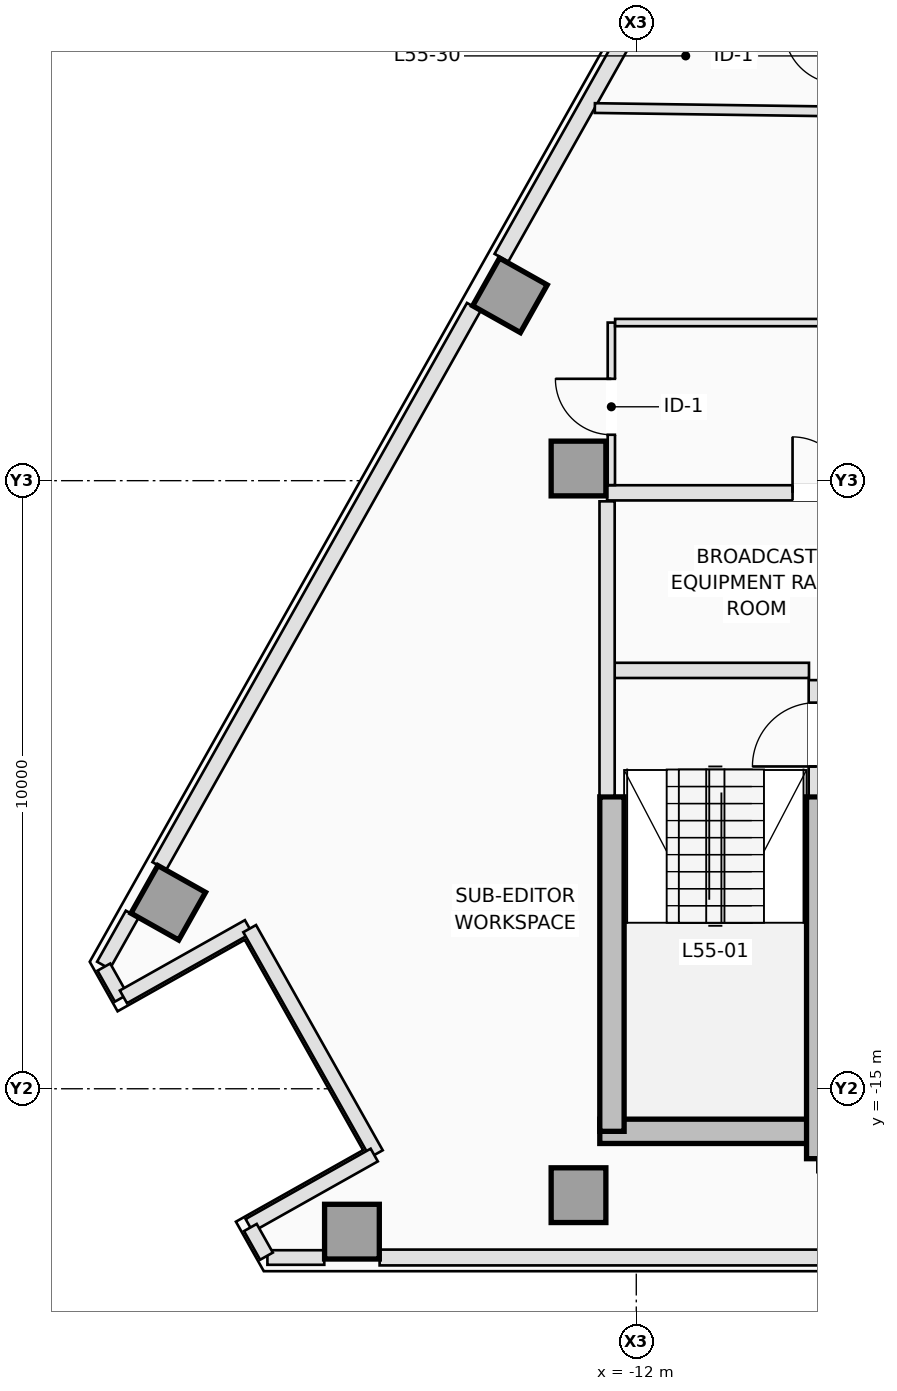
"""IFC4 building model, lengths in metres.
Left out: names, types, materials, properties, quantities, classifications, styles, units other than length and angle.
Written with IfcOpenShell. Run it as: python <this file> out.ifc"""

import sys

from ifc_helpers import new_model, si_unit, direction, frame, frame_2d, origin, origin_2d, place, context, subcontext, project, spatial, rectangle, extrude, element, fill, save


model = new_model("IFC4")
c1 = context("Model", 3, precision=1e-05, world=origin(), true_north=direction((0.0, 1.0)))
c2 = subcontext(c1, "Body", "Model", "MODEL_VIEW")
j1 = project(units=[si_unit("LENGTHUNIT", "METRE"), si_unit("PLANEANGLEUNIT", "RADIAN")], contexts=[c1])
p1 = place(None, origin())
s1 = spatial("IfcSite", under=j1, at=p1, CompositionType="ELEMENT")
p2 = place(p1, origin())
s2 = spatial("IfcBuilding", under=s1, at=p2, CompositionType="ELEMENT")
p3 = place(p2, frame((0.0, 0.0, 200.9)))
s3 = spatial("IfcBuildingStorey", under=s2, at=p3, CompositionType="ELEMENT", Elevation=200.9)
p4 = place(p3, frame((-12.6, -15.7, 0.0), z_axis=(0.0, 0.0, 1.0), x_axis=(1.0, 0.0, 0.0)))
e1 = element("IfcWall", 1, at=p4, inside=s3, PredefinedType="SHEAR", context=c2, shape_type="SweptSolid", body=[
    extrude(rectangle(XDim=3.8, YDim=0.4, at=frame_2d((1.9, 0.0))), origin(), (0.0, 0.0, 1.0), 3.5),
])
p5 = place(p3, frame((-12.4, -15.7, 0.0), z_axis=(0.0, 0.0, 1.0), x_axis=(0.0, 1.0, 0.0)))
e2 = element("IfcWall", 2, at=p5, inside=s3, PredefinedType="SHEAR", context=c2, shape_type="SweptSolid", body=[
    extrude(rectangle(XDim=5.5, YDim=0.4, at=frame_2d((2.75, 0.0))), origin(), (0.0, 0.0, 1.0), 3.5),
])
p6 = place(p3, frame((-9.0, -16.15, 0.0), z_axis=(0.0, 0.0, 1.0), x_axis=(0.0, 1.0, 0.0)))
e3 = element("IfcWall", 3, at=p6, inside=s3, PredefinedType="SHEAR", context=c2, shape_type="SweptSolid", body=[
    extrude(rectangle(XDim=5.95, YDim=0.4, at=frame_2d((2.975, 0.0))), origin(), (0.0, 0.0, 1.0), 3.5),
])
for number, where, z_axis, x_axis in (
    (4, (-12.95, -16.75, 0.0), (0.0, 0.0, 1.0), (1.0, 0.0, 0.0)),
    (5, (-12.95, -4.8, 0.0), (0.0, 0.0, 1.0), (1.0, 0.0, 0.0)),
    (6, (-16.676, -17.35, 0.0), (0.0, 0.0, 1.0), (0.0, 1.0, 0.0)),
    (7, (-14.077, -1.952, 0.0), (0.0, 0.0, 1.0), (-0.872, 0.49, 0.0)),
    (8, (-19.697, -11.942, 0.0), (0.0, 0.0, 1.0), (-0.872, 0.49, 0.0)),
):
    element("IfcColumn", number, at=place(p3, frame(where, z_axis=z_axis, x_axis=x_axis)), inside=s3, PredefinedType="COLUMN", context=c2, shape_type="SweptSolid", body=[
        extrude(rectangle(XDim=0.9, YDim=0.9, at=origin_2d()), origin(), (0.0, 0.0, 1.0), 3.5),
    ])
p7 = place(p3, frame((-17.131, -17.775, 0.0), z_axis=(0.0, 0.0, 1.0), x_axis=(-1.0, 0.0, 0.0)))
e9 = element("IfcWall", 9, at=p7, inside=s3, PredefinedType="STANDARD", context=c2, shape_type="SweptSolid", body=[
    extrude(rectangle(XDim=0.935, YDim=0.24, at=frame_2d((0.468, 0.0))), origin(), (0.0, 0.0, 1.0), 3.25),
])
p8 = place(p3, frame((-5.893, -17.775, 0.0), z_axis=(0.0, 0.0, 1.0), x_axis=(-1.0, 0.0, 0.0)))
e10 = element("IfcWall", 10, at=p8, inside=s3, PredefinedType="STANDARD", context=c2, shape_type="SweptSolid", body=[
    extrude(rectangle(XDim=10.328, YDim=0.26, at=frame_2d((5.164, 0.0))), origin(), (0.0, 0.0, 1.0), 3.25),
])
p9 = place(p3, frame((-20.762, -12.97, 0.0), z_axis=(0.0, 0.0, 1.0), x_axis=(0.490345412687, 0.87152818443, 0.0)))
e11 = element("IfcWall", 11, at=p9, inside=s3, PredefinedType="STANDARD", context=c2, shape_type="SweptSolid", body=[
    extrude(rectangle(XDim=0.964, YDim=0.24, at=frame_2d((0.482, 0.0))), origin(), (0.0, 0.0, 1.0), 3.25),
])
p10 = place(p3, frame((-19.844, -11.337, 0.0), z_axis=(0.0, 0.0, 1.0), x_axis=(0.490246958575, 0.871583570066, 0.0)))
e12 = element("IfcWall", 12, at=p10, inside=s3, PredefinedType="STANDARD", context=c2, shape_type="SweptSolid", body=[
    extrude(rectangle(XDim=10.552, YDim=0.26, at=frame_2d((5.276, 0.0))), origin(), (0.0, 0.0, 1.0), 3.25),
])
p11 = place(p3, frame((-14.217, -1.334, 0.0), z_axis=(0.0, 0.0, 1.0), x_axis=(0.490261239633, 0.871575537125, 0.0)))
e13 = element("IfcWall", 13, at=p11, inside=s3, PredefinedType="STANDARD", context=c2, shape_type="SweptSolid", body=[
    extrude(rectangle(XDim=4.388, YDim=0.26, at=frame_2d((2.194, 0.0))), origin(), (0.0, 0.0, 1.0), 3.25),
])
p12 = place(p3, frame((-20.755, -12.999, 0.0), z_axis=(0.0, 0.0, 1.0), x_axis=(0.490320776404, -0.871542045014, 0.0)))
e14 = element("IfcWall", 14, at=p12, inside=s3, PredefinedType="STANDARD", context=c2, shape_type="SweptSolid", body=[
    extrude(rectangle(XDim=0.584, YDim=0.24, at=frame_2d((0.292, 0.0))), origin(), (0.0, 0.0, 1.0), 3.25),
])
p13 = place(p3, frame((-20.434, -13.489, 0.0), z_axis=(0.0, 0.0, 1.0), x_axis=(0.871578299909, 0.490256327984, 0.0)))
e15 = element("IfcWall", 15, at=p13, inside=s3, PredefinedType="STANDARD", context=c2, shape_type="SweptSolid", body=[
    extrude(rectangle(XDim=2.36, YDim=0.24, at=frame_2d((1.18, 0.0))), origin(), (0.0, 0.0, 1.0), 3.25),
])
p14 = place(p3, frame((-18.358, -12.366, 0.0), z_axis=(0.0, 0.0, 1.0), x_axis=(0.49027487746, -0.871567865706, 0.0)))
e16 = element("IfcWall", 16, at=p14, inside=s3, PredefinedType="STANDARD", context=c2, shape_type="SweptSolid", body=[
    extrude(rectangle(XDim=4.25, YDim=0.24, at=frame_2d((2.125, 0.0))), origin(), (0.0, 0.0, 1.0), 2.722),
])
p15 = place(p3, frame((-16.309, -16.09, 0.0), z_axis=(0.0, 0.0, 1.0), x_axis=(-0.871578299909, -0.490256327984, 0.0)))
e17 = element("IfcWall", 17, at=p15, inside=s3, PredefinedType="STANDARD", context=c2, shape_type="SweptSolid", body=[
    extrude(rectangle(XDim=2.36, YDim=0.24, at=frame_2d((1.18, 0.0))), origin(), (0.0, 0.0, 1.0), 3.25),
])
p16 = place(p3, frame((-18.346, -17.282, 0.0), z_axis=(0.0, 0.0, 1.0), x_axis=(0.49038986747, -0.87150317147, 0.0)))
e18 = element("IfcWall", 18, at=p16, inside=s3, PredefinedType="STANDARD", context=c2, shape_type="SweptSolid", body=[
    extrude(rectangle(XDim=0.541, YDim=0.24, at=frame_2d((0.271, 0.0))), origin(), (0.0, 0.0, 1.0), 3.25),
])
p17 = place(p3, frame((-9.04, -10.18, 0.0), z_axis=(0.0, 0.0, 1.0), x_axis=(0.0, 1.0, 0.0)))
e19 = element("IfcWall", 19, at=p17, inside=s3, PredefinedType="PARTITIONING", context=c2, shape_type="SweptSolid", body=[
    extrude(rectangle(XDim=1.9, YDim=0.25, at=frame_2d((0.95, 0.0))), origin(), (0.0, 0.0, 1.0), 3.25),
])
p18 = place(p17, frame((0.48, 0.0, 0.0)))
e20 = element("IfcOpeningElement", 20, at=p18, cuts=e19, PredefinedType="OPENING", context=c2, shape_type="SweptSolid", body=[
    extrude(rectangle(XDim=1.05, YDim=2.15, at=frame_2d((0.525, 1.075))), frame((0.0, 0.135, 0.0), z_axis=(0.0, -1.0, 0.0), x_axis=(1.0, 0.0, 0.0)), (0.0, 0.0, 1.0), 0.27),
])
p19 = place(p3, frame((-12.38, -8.12, 0.0), z_axis=(0.0, 0.0, 1.0), x_axis=(1.0, 0.0, 0.0)))
e21 = element("IfcWall", 21, at=p19, inside=s3, PredefinedType="PARTITIONING", context=c2, shape_type="SweptSolid", body=[
    extrude(rectangle(XDim=3.22, YDim=0.25, at=frame_2d((1.61, 0.0))), origin(), (0.0, 0.0, 1.0), 3.25),
])
p20 = place(p3, frame((-12.48, -10.18, 0.0), z_axis=(0.0, 0.0, 1.0), x_axis=(0.0, 1.0, 0.0)))
e22 = element("IfcWall", 22, at=p20, inside=s3, PredefinedType="PARTITIONING", context=c2, shape_type="SweptSolid", body=[
    extrude(rectangle(XDim=4.84, YDim=0.25, at=frame_2d((2.42, 0.0))), origin(), (0.0, 0.0, 1.0), 3.25),
])
p21 = place(p3, frame((-12.48, -5.2, 0.0), z_axis=(0.0, 0.0, 1.0), x_axis=(1.0, 0.0, 0.0)))
e23 = element("IfcWall", 23, at=p21, inside=s3, PredefinedType="PARTITIONING", context=c2, shape_type="SweptSolid", body=[
    extrude(rectangle(XDim=8.278, YDim=0.25, at=frame_2d((4.139, 0.0))), origin(), (0.0, 0.0, 1.0), 3.25),
])
p22 = place(p21, frame((3.05, 0.0, 0.0)))
e24 = element("IfcOpeningElement", 24, at=p22, cuts=e23, PredefinedType="OPENING", context=c2, shape_type="SweptSolid", body=[
    extrude(rectangle(XDim=0.92, YDim=2.12, at=frame_2d((0.46, 1.06))), frame((0.0, 0.135, 0.0), z_axis=(0.0, -1.0, 0.0), x_axis=(1.0, 0.0, 0.0)), (0.0, 0.0, 1.0), 0.27),
])
p23 = place(p21, frame((6.15, 0.0, 0.0)))
e25 = element("IfcOpeningElement", 25, at=p23, cuts=e23, PredefinedType="OPENING", context=c2, shape_type="SweptSolid", body=[
    extrude(rectangle(XDim=0.92, YDim=2.12, at=frame_2d((0.46, 1.06))), frame((0.0, 0.135, 0.0), z_axis=(0.0, -1.0, 0.0), x_axis=(1.0, 0.0, 0.0)), (0.0, 0.0, 1.0), 0.27),
])
p24 = place(p3, frame((-12.41, -5.073, 0.0), z_axis=(0.0, 0.0, 1.0), x_axis=(0.0, 1.0, 0.0)))
e26 = element("IfcWall", 26, at=p24, inside=s3, PredefinedType="PARTITIONING", context=c2, shape_type="SweptSolid", body=[
    extrude(rectangle(XDim=2.673, YDim=0.12, at=frame_2d((1.336, 0.0))), origin(), (0.0, 0.0, 1.0), 3.25),
])
p25 = place(p24, frame((0.828, 0.0, 0.0)))
e27 = element("IfcOpeningElement", 27, at=p25, cuts=e26, PredefinedType="OPENING", context=c2, shape_type="SweptSolid", body=[
    extrude(rectangle(XDim=0.92, YDim=2.12, at=frame_2d((0.46, 1.06))), frame((0.0, 0.07, 0.0), z_axis=(0.0, -1.0, 0.0), x_axis=(1.0, 0.0, 0.0)), (0.0, 0.0, 1.0), 0.14),
])
p26 = place(p3, frame((-12.348, -2.4, 0.0), z_axis=(0.0, 0.0, 1.0), x_axis=(1.0, 0.0, 0.0)))
e28 = element("IfcWall", 28, at=p26, inside=s3, PredefinedType="PARTITIONING", context=c2, shape_type="SweptSolid", body=[
    extrude(rectangle(XDim=3.698, YDim=0.12, at=frame_2d((1.849, 0.0))), origin(), (0.0, 0.0, 1.0), 3.25),
])
p27 = place(p3, frame((-8.76, 1.073, 0.0), z_axis=(0.0, 0.0, 1.0), x_axis=(-0.999901887135, 0.014007715871, 0.0)))
e29 = element("IfcWall", 29, at=p27, inside=s3, PredefinedType="PARTITIONING", context=c2, shape_type="SweptSolid", body=[
    extrude(rectangle(XDim=3.922, YDim=0.16, at=frame_2d((1.961, 0.0))), origin(), (0.0, 0.0, 1.0), 3.25),
])
p28 = place(p18, origin())
e30 = element("IfcDoor", 30, at=p28, inside=s3, OperationType="SINGLE_SWING_LEFT", PredefinedType="DOOR", context=c2, shape_type="SweptSolid", body=[
    extrude(rectangle(XDim=1.05, YDim=2.15, at=frame_2d((0.525, 1.075))), frame((0.0, 0.025, 0.0), z_axis=(0.0, -1.0, 0.0), x_axis=(1.0, 0.0, 0.0)), (0.0, 0.0, 1.0), 0.05),
])
fill(e20, e30)
p29 = place(p22, origin())
e31 = element("IfcDoor", 31, at=p29, inside=s3, OperationType="SINGLE_SWING_LEFT", PredefinedType="DOOR", context=c2, shape_type="SweptSolid", body=[
    extrude(rectangle(XDim=0.92, YDim=2.12, at=frame_2d((0.46, 1.06))), frame((0.0, 0.025, 0.0), z_axis=(0.0, -1.0, 0.0), x_axis=(1.0, 0.0, 0.0)), (0.0, 0.0, 1.0), 0.05),
])
fill(e24, e31)
p30 = place(p25, origin())
e32 = element("IfcDoor", 32, at=p30, inside=s3, OperationType="SINGLE_SWING_RIGHT", PredefinedType="DOOR", context=c2, shape_type="SweptSolid", body=[
    extrude(rectangle(XDim=0.92, YDim=2.12, at=frame_2d((0.46, 1.06))), frame((0.0, 0.025, 0.0), z_axis=(0.0, -1.0, 0.0), x_axis=(1.0, 0.0, 0.0)), (0.0, 0.0, 1.0), 0.05),
])
fill(e27, e32)
save(model, sys.argv[1])
